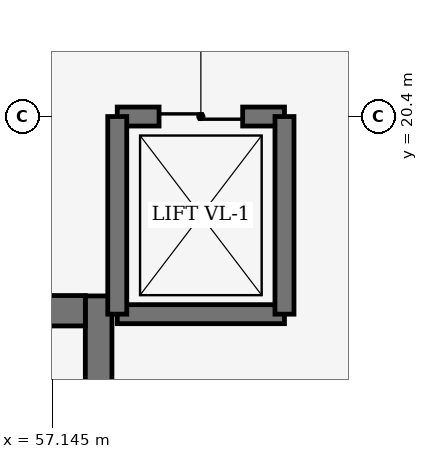
"""IFC4 building model, lengths in metres.
Left out: names, types, materials, properties, quantities, classifications, styles, units other than length and angle.
Written with IfcOpenShell. Run it as: python <this file> out.ifc"""

import sys

from ifc_helpers import new_model, si_unit, direction, frame, frame_2d, origin, place, context, subcontext, project, spatial, rectangle, extrude, element, fill, save


model = new_model("IFC4")
c1 = context("Model", 3, precision=1e-05, world=origin(), true_north=direction((0.0, 1.0)))
c2 = subcontext(c1, "Body", "Model", "MODEL_VIEW")
j1 = project(units=[si_unit("LENGTHUNIT", "METRE"), si_unit("PLANEANGLEUNIT", "RADIAN")], contexts=[c1])
p1 = place(None, origin())
s1 = spatial("IfcSite", under=j1, at=p1, CompositionType="ELEMENT")
p2 = place(p1, origin())
s2 = spatial("IfcBuilding", under=s1, at=p2, CompositionType="ELEMENT")
p3 = place(p2, frame((0.0, 0.0, -4.8)))
s3 = spatial("IfcBuildingStorey", under=s2, at=p3, CompositionType="ELEMENT", Elevation=-4.8)
p4 = place(p3, frame((57.755, 13.45, 0.0), z_axis=(0.0, 0.0, 1.0), x_axis=(0.0, 1.0, 0.0)))
e1 = element("IfcWall", 1, at=p4, inside=s3, PredefinedType="SHEAR", context=c2, shape_type="SweptSolid", body=[
    extrude(rectangle(XDim=4.59, YDim=0.35, at=frame_2d((2.295, 0.0))), origin(), (0.0, 0.0, 1.0), 4.5),
])
p5 = place(p3, frame((49.6, 17.845, 0.0), z_axis=(0.0, 0.0, 1.0), x_axis=(1.0, 0.0, 0.0)))
e2 = element("IfcWall", 2, at=p5, inside=s3, PredefinedType="SHEAR", context=c2, shape_type="SweptSolid", body=[
    extrude(rectangle(XDim=7.98, YDim=0.4, at=frame_2d((3.99, 0.0))), origin(), (0.0, 0.0, 1.0), 4.5),
])
p6 = place(p3, frame((58.0, 17.8, 0.0), z_axis=(0.0, 0.0, 1.0), x_axis=(1.0, 0.0, 0.0)))
e3 = element("IfcWall", 3, at=p6, inside=s3, PredefinedType="SHEAR", context=c2, shape_type="SweptSolid", body=[
    extrude(rectangle(XDim=2.2, YDim=0.25, at=frame_2d((1.1, 0.0))), origin(), (0.0, 0.0, 1.0), 4.5),
])
p7 = place(p3, frame((58.0, 20.4, 0.0), z_axis=(0.0, 0.0, 1.0), x_axis=(1.0, 0.0, 0.0)))
e4 = element("IfcWall", 4, at=p7, inside=s3, PredefinedType="SHEAR", context=c2, shape_type="SweptSolid", body=[
    extrude(rectangle(XDim=2.2, YDim=0.25, at=frame_2d((1.1, 0.0))), origin(), (0.0, 0.0, 1.0), 4.5),
])
p8 = place(p7, frame((0.55, 0.0, 0.0)))
e5 = element("IfcOpeningElement", 5, at=p8, cuts=e4, PredefinedType="OPENING", context=c2, shape_type="SweptSolid", body=[
    extrude(rectangle(XDim=1.1, YDim=2.2, at=frame_2d((0.55, 1.1))), frame((0.0, 0.135, 0.0), z_axis=(0.0, -1.0, 0.0), x_axis=(1.0, 0.0, 0.0)), (0.0, 0.0, 1.0), 0.27),
])
for number, where, z_axis, x_axis in (
    (6, (58.0, 17.8, 0.0), (0.0, 0.0, 1.0), (0.0, 1.0, 0.0)),
    (7, (60.2, 17.8, 0.0), (0.0, 0.0, 1.0), (0.0, 1.0, 0.0)),
):
    element("IfcWall", number, at=place(p3, frame(where, z_axis=z_axis, x_axis=x_axis)), inside=s3, PredefinedType="SHEAR", context=c2, shape_type="SweptSolid", body=[
        extrude(rectangle(XDim=2.6, YDim=0.25, at=frame_2d((1.3, 0.0))), origin(), (0.0, 0.0, 1.0), 4.5),
    ])
p9 = place(p8, origin())
e8 = element("IfcDoor", 8, at=p9, inside=s3, OperationType="DOUBLE_DOOR_SLIDING", PredefinedType="DOOR", context=c2, shape_type="SweptSolid", body=[
    extrude(rectangle(XDim=1.1, YDim=2.2, at=frame_2d((0.55, 1.1))), frame((0.0, 0.025, 0.0), z_axis=(0.0, -1.0, 0.0), x_axis=(1.0, 0.0, 0.0)), (0.0, 0.0, 1.0), 0.05),
])
fill(e5, e8)
save(model, sys.argv[1])
